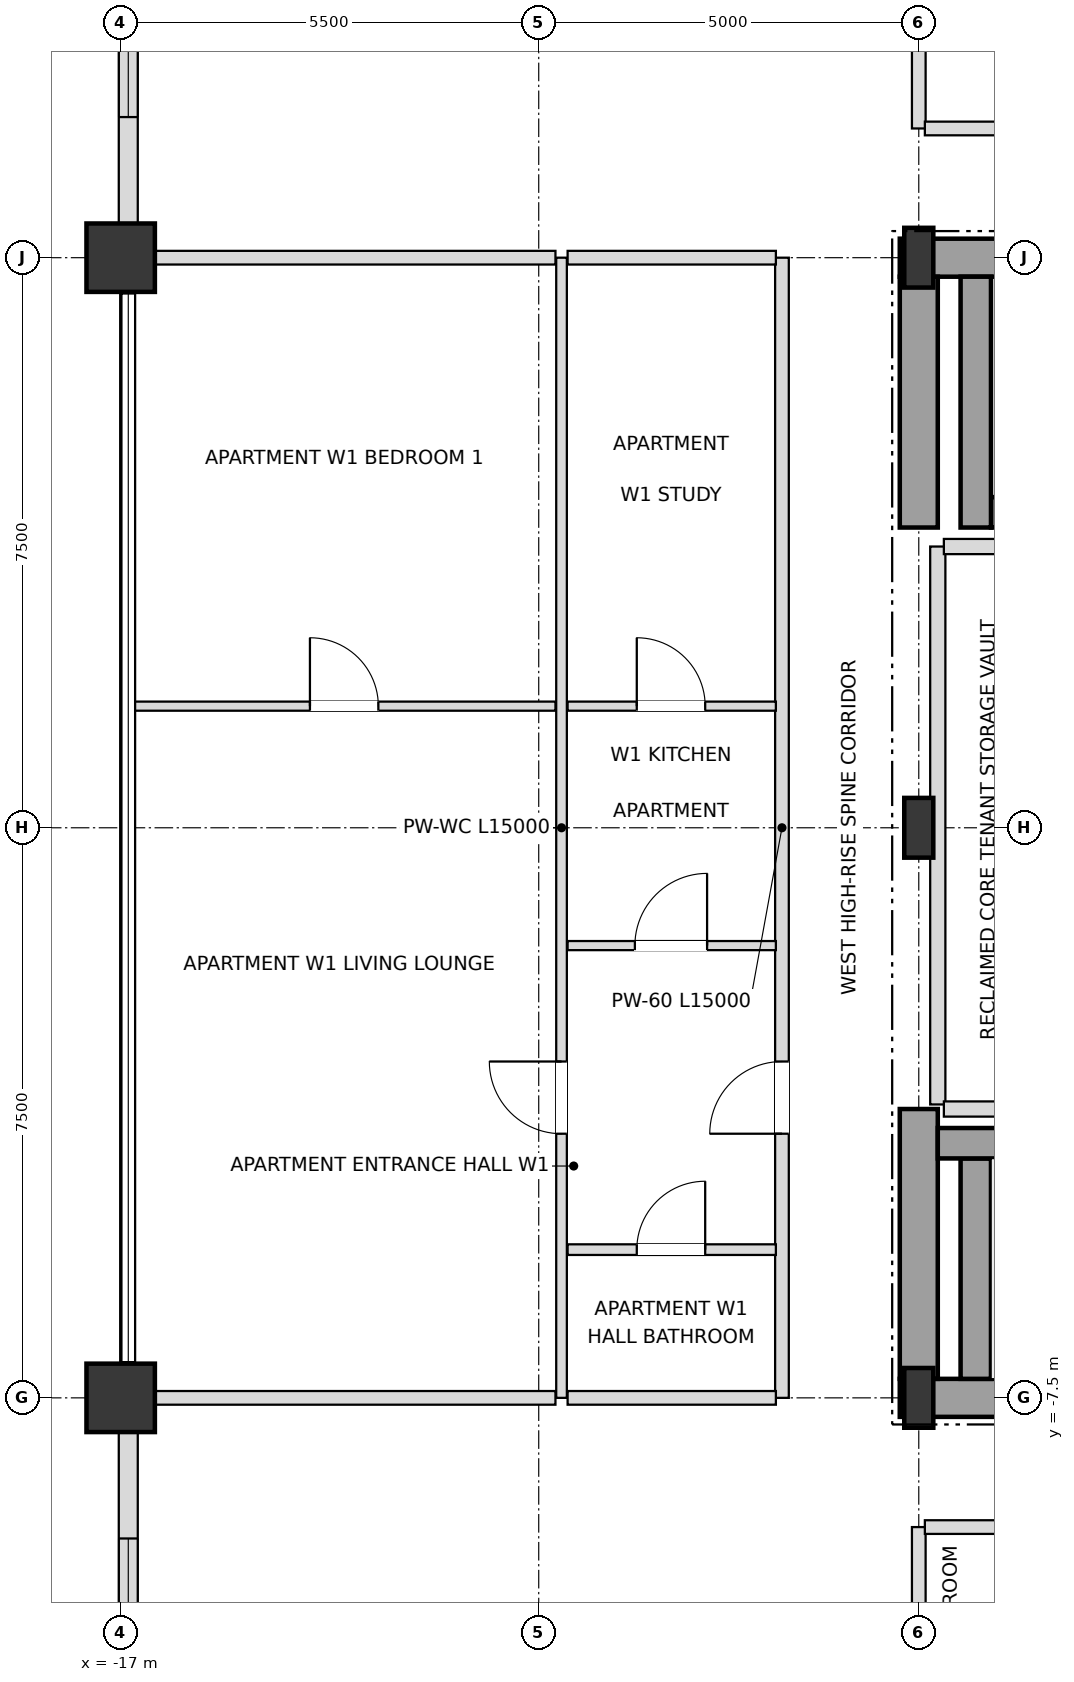
"""IFC4 building model, lengths in metres.
Left out: names, types, materials, properties, quantities, classifications, styles, units other than length and angle.
Written with IfcOpenShell. Run it as: python <this file> out.ifc"""

import sys

from ifc_helpers import new_model, si_unit, direction, frame, frame_2d, origin, origin_2d, place, context, subcontext, project, spatial, rectangle, i_section, extrude, element, fill, save


model = new_model("IFC4")
c1 = context("Model", 3, precision=1e-05, world=origin(), true_north=direction((0.0, 1.0)))
c2 = subcontext(c1, "Body", "Model", "MODEL_VIEW")
j1 = project(units=[si_unit("LENGTHUNIT", "METRE"), si_unit("PLANEANGLEUNIT", "RADIAN")], contexts=[c1])
p1 = place(None, origin())
s1 = spatial("IfcSite", under=j1, at=p1, CompositionType="ELEMENT")
p2 = place(p1, origin())
s2 = spatial("IfcBuilding", under=s1, at=p2, CompositionType="ELEMENT")
p3 = place(p2, frame((0.0, 0.0, 297.9)))
s3 = spatial("IfcBuildingStorey", under=s2, at=p3, CompositionType="ELEMENT", Elevation=297.9)
for number, where, z_axis, x_axis in (
    (1, (-6.5, -7.5, 0.0), (0.0, 0.0, 1.0), (1.0, 0.0, 0.0)),
    (2, (-6.5, 0.0, 0.0), (0.0, 0.0, 1.0), (1.0, 0.0, 0.0)),
    (3, (-6.5, 7.5, 0.0), (0.0, 0.0, 1.0), (1.0, 0.0, 0.0)),
):
    element("IfcColumn", number, at=place(p3, frame(where, z_axis=z_axis, x_axis=x_axis)), inside=s3, PredefinedType="COLUMN", context=c2, shape_type="SweptSolid", body=[
        extrude(i_section(OverallWidth=0.382, OverallDepth=0.786, WebThickness=0.02, FlangeThickness=0.033, at=origin_2d()), origin(), (0.0, 0.0, 1.0), 3.6),
    ])
for number, where, z_axis, x_axis in (
    (4, (-17.0, 7.5, 0.0), (0.0, 0.0, 1.0), (1.0, 0.0, 0.0)),
    (5, (-17.0, -7.5, 0.0), (0.0, 0.0, 1.0), (1.0, 0.0, 0.0)),
):
    element("IfcColumn", number, at=place(p3, frame(where, z_axis=z_axis, x_axis=x_axis)), inside=s3, PredefinedType="USERDEFINED", context=c2, shape_type="SweptSolid", body=[
        extrude(rectangle(XDim=0.9, YDim=0.9, at=origin_2d()), origin(), (0.0, 0.0, 1.0), 3.6),
    ])
p4 = place(p3, frame((-16.9, 12.555, 0.0), z_axis=(0.0, 0.0, 1.0), x_axis=(0.0, -1.0, 0.0)))
e6 = element("IfcWall", 6, at=p4, inside=s3, PredefinedType="SOLIDWALL", context=c2, shape_type="SweptSolid", body=[
    extrude(rectangle(XDim=4.61, YDim=0.25, at=frame_2d((2.305, 0.0))), origin(), (0.0, 0.0, 1.0), 2.748),
])
p5 = place(p4, frame((1.405, 0.0, 0.72)))
e7 = element("IfcOpeningElement", 7, at=p5, cuts=e6, PredefinedType="OPENING", context=c2, shape_type="SweptSolid", body=[
    extrude(rectangle(XDim=1.8, YDim=1.68, at=frame_2d((0.9, 0.84))), frame((0.0, 0.135, 0.0), z_axis=(0.0, -1.0, 0.0), x_axis=(1.0, 0.0, 0.0)), (0.0, 0.0, 1.0), 0.27),
])
p6 = place(p3, frame((-16.9, -7.945, 0.0), z_axis=(0.0, 0.0, 1.0), x_axis=(0.0, -1.0, 0.0)))
e8 = element("IfcWall", 8, at=p6, inside=s3, PredefinedType="SOLIDWALL", context=c2, shape_type="SweptSolid", body=[
    extrude(rectangle(XDim=4.61, YDim=0.25, at=frame_2d((2.305, 0.0))), origin(), (0.0, 0.0, 1.0), 2.748),
])
p7 = place(p6, frame((1.405, 0.0, 0.72)))
e9 = element("IfcOpeningElement", 9, at=p7, cuts=e8, PredefinedType="OPENING", context=c2, shape_type="SweptSolid", body=[
    extrude(rectangle(XDim=1.8, YDim=1.68, at=frame_2d((0.9, 0.84))), frame((0.0, 0.135, 0.0), z_axis=(0.0, -1.0, 0.0), x_axis=(1.0, 0.0, 0.0)), (0.0, 0.0, 1.0), 0.27),
])
p8 = place(p3, frame((-6.75, -7.5, 0.0), z_axis=(0.0, 0.0, 1.0), x_axis=(1.0, 0.0, 0.0)))
e10 = element("IfcWall", 10, at=p8, inside=s3, PredefinedType="SHEAR", context=c2, shape_type="SweptSolid", body=[
    extrude(rectangle(XDim=6.75, YDim=0.5, at=frame_2d((3.375, 0.0))), origin(), (0.0, 0.0, 1.0), 3.38),
])
p9 = place(p3, frame((-6.75, 7.5, 0.0), z_axis=(0.0, 0.0, 1.0), x_axis=(1.0, 0.0, 0.0)))
e11 = element("IfcWall", 11, at=p9, inside=s3, PredefinedType="SHEAR", context=c2, shape_type="SweptSolid", body=[
    extrude(rectangle(XDim=6.75, YDim=0.5, at=frame_2d((3.375, 0.0))), origin(), (0.0, 0.0, 1.0), 3.38),
])
p10 = place(p9, frame((1.65, 0.0, 0.0)))
e12 = element("IfcOpeningElement", 12, at=p10, cuts=e11, PredefinedType="OPENING", context=c2, shape_type="SweptSolid", body=[
    extrude(rectangle(XDim=1.05, YDim=2.15, at=frame_2d((0.525, 1.075))), frame((0.0, 0.26, 0.0), z_axis=(0.0, -1.0, 0.0), x_axis=(1.0, 0.0, 0.0)), (0.0, 0.0, 1.0), 0.52),
])
p11 = place(p3, frame((-6.5, -7.25, 0.0), z_axis=(0.0, 0.0, 1.0), x_axis=(0.0, 1.0, 0.0)))
e13 = element("IfcWall", 13, at=p11, inside=s3, PredefinedType="SHEAR", context=c2, shape_type="SweptSolid", body=[
    extrude(rectangle(XDim=3.55, YDim=0.5, at=frame_2d((1.775, 0.0))), origin(), (0.0, 0.0, 1.0), 3.38),
])
p12 = place(p3, frame((-6.5, 3.95, 0.0), z_axis=(0.0, 0.0, 1.0), x_axis=(0.0, 1.0, 0.0)))
e14 = element("IfcWall", 14, at=p12, inside=s3, PredefinedType="SHEAR", context=c2, shape_type="SweptSolid", body=[
    extrude(rectangle(XDim=3.3, YDim=0.5, at=frame_2d((1.65, 0.0))), origin(), (0.0, 0.0, 1.0), 3.38),
])
p13 = place(p3, frame((-5.75, -7.25, 0.0), z_axis=(0.0, 0.0, 1.0), x_axis=(0.0, 1.0, 0.0)))
e15 = element("IfcWall", 15, at=p13, inside=s3, PredefinedType="SHEAR", context=c2, shape_type="SweptSolid", body=[
    extrude(rectangle(XDim=2.9, YDim=0.4, at=frame_2d((1.45, 0.0))), origin(), (0.0, 0.0, 1.0), 3.38),
])
p14 = place(p3, frame((-6.25, -4.15, 0.0), z_axis=(0.0, 0.0, 1.0), x_axis=(1.0, 0.0, 0.0)))
e16 = element("IfcWall", 16, at=p14, inside=s3, PredefinedType="SHEAR", context=c2, shape_type="SweptSolid", body=[
    extrude(rectangle(XDim=7.78, YDim=0.4, at=frame_2d((3.89, 0.0))), origin(), (0.0, 0.0, 1.0), 3.38),
])
p15 = place(p3, frame((-5.55, 4.15, 0.0), z_axis=(0.0, 0.0, 1.0), x_axis=(1.0, 0.0, 0.0)))
e17 = element("IfcWall", 17, at=p15, inside=s3, PredefinedType="SHEAR", context=c2, shape_type="SweptSolid", body=[
    extrude(rectangle(XDim=7.08, YDim=0.4, at=frame_2d((3.54, 0.0))), origin(), (0.0, 0.0, 1.0), 3.38),
])
p16 = place(p3, frame((-5.75, 3.95, 0.0), z_axis=(0.0, 0.0, 1.0), x_axis=(0.0, 1.0, 0.0)))
e18 = element("IfcWall", 18, at=p16, inside=s3, PredefinedType="SHEAR", context=c2, shape_type="SweptSolid", body=[
    extrude(rectangle(XDim=3.3, YDim=0.4, at=frame_2d((1.65, 0.0))), origin(), (0.0, 0.0, 1.0), 3.38),
])
p17 = place(p3, frame((-11.2, -7.5, 0.0), z_axis=(0.0, 0.0, 1.0), x_axis=(0.0, 1.0, 0.0)))
e19 = element("IfcWall", 19, at=p17, inside=s3, PredefinedType="PARTITIONING", context=c2, shape_type="SweptSolid", body=[
    extrude(rectangle(XDim=15.0, YDim=0.14, at=frame_2d((7.5, 0.0))), origin(), (0.0, 0.0, 1.0), 3.38),
])
p18 = place(p17, frame((3.475, 0.0, 0.0)))
e20 = element("IfcOpeningElement", 20, at=p18, cuts=e19, PredefinedType="OPENING", context=c2, shape_type="SweptSolid", body=[
    extrude(rectangle(XDim=0.95, YDim=2.1, at=frame_2d((0.475, 1.05))), frame((0.0, 0.08, 0.0), z_axis=(0.0, -1.0, 0.0), x_axis=(1.0, 0.0, 0.0)), (0.0, 0.0, 1.0), 0.16),
])
p19 = place(p3, frame((-8.3, -7.5, 0.0), z_axis=(0.0, 0.0, 1.0), x_axis=(0.0, 1.0, 0.0)))
e21 = element("IfcWall", 21, at=p19, inside=s3, PredefinedType="PARTITIONING", context=c2, shape_type="SweptSolid", body=[
    extrude(rectangle(XDim=15.0, YDim=0.18, at=frame_2d((7.5, 0.0))), origin(), (0.0, 0.0, 1.0), 3.38),
])
p20 = place(p19, frame((3.475, 0.0, 0.0)))
e22 = element("IfcOpeningElement", 22, at=p20, cuts=e21, PredefinedType="OPENING", context=c2, shape_type="SweptSolid", body=[
    extrude(rectangle(XDim=0.95, YDim=2.15, at=frame_2d((0.475, 1.075))), frame((0.0, 0.1, 0.0), z_axis=(0.0, -1.0, 0.0), x_axis=(1.0, 0.0, 0.0)), (0.0, 0.0, 1.0), 0.2),
])
for number, where, z_axis, x_axis in (
    (23, (-6.5, -19.9, 0.0), (0.0, 0.0, 1.0), (0.0, 1.0, 0.0)),
    (24, (-6.5, 9.2, 0.0), (0.0, 0.0, 1.0), (0.0, 1.0, 0.0)),
):
    element("IfcWall", number, at=place(p3, frame(where, z_axis=z_axis, x_axis=x_axis)), inside=s3, PredefinedType="PARTITIONING", context=c2, shape_type="SweptSolid", body=[
        extrude(rectangle(XDim=10.7, YDim=0.18, at=frame_2d((5.35, 0.0))), origin(), (0.0, 0.0, 1.0), 2.826),
    ])
p21 = place(p3, frame((-6.25, -3.64, 0.0), z_axis=(0.0, 0.0, 1.0), x_axis=(0.0, 1.0, 0.0)))
e25 = element("IfcWall", 25, at=p21, inside=s3, PredefinedType="SOLIDWALL", context=c2, shape_type="SweptSolid", body=[
    extrude(rectangle(XDim=7.34, YDim=0.2, at=frame_2d((3.67, 0.0))), origin(), (0.0, 0.0, 1.0), 3.38),
])
p22 = place(p3, frame((-6.42, -9.2, 0.0), z_axis=(0.0, 0.0, 1.0), x_axis=(1.0, 0.0, 0.0)))
e26 = element("IfcWall", 26, at=p22, inside=s3, PredefinedType="PARTITIONING", context=c2, shape_type="SweptSolid", body=[
    extrude(rectangle(XDim=1.64, YDim=0.18, at=frame_2d((0.82, 0.0))), origin(), (0.0, 0.0, 1.0), 3.38),
])
p23 = place(p3, frame((-16.9, -7.5, 0.0), z_axis=(0.0, 0.0, 1.0), x_axis=(1.0, 0.0, 0.0)))
e27 = element("IfcWall", 27, at=p23, inside=s3, PredefinedType="PARTITIONING", context=c2, shape_type="SweptSolid", body=[
    extrude(rectangle(XDim=5.62, YDim=0.18, at=frame_2d((2.81, 0.0))), origin(), (0.0, 0.0, 1.0), 2.826),
])
p24 = place(p3, frame((-11.12, -7.5, 0.0), z_axis=(0.0, 0.0, 1.0), x_axis=(1.0, 0.0, 0.0)))
e28 = element("IfcWall", 28, at=p24, inside=s3, PredefinedType="PARTITIONING", context=c2, shape_type="SweptSolid", body=[
    extrude(rectangle(XDim=2.74, YDim=0.18, at=frame_2d((1.37, 0.0))), origin(), (0.0, 0.0, 1.0), 2.826),
])
p25 = place(p3, frame((-11.12, -5.55, 0.0), z_axis=(0.0, 0.0, 1.0), x_axis=(1.0, 0.0, 0.0)))
e29 = element("IfcWall", 29, at=p25, inside=s3, PredefinedType="PARTITIONING", context=c2, shape_type="SweptSolid", body=[
    extrude(rectangle(XDim=2.74, YDim=0.14, at=frame_2d((1.37, 0.0))), origin(), (0.0, 0.0, 1.0), 3.38),
])
p26 = place(p25, frame((0.91, 0.0, 0.0)))
e30 = element("IfcOpeningElement", 30, at=p26, cuts=e29, PredefinedType="OPENING", context=c2, shape_type="SweptSolid", body=[
    extrude(rectangle(XDim=0.9, YDim=2.1, at=frame_2d((0.45, 1.05))), frame((0.0, 0.08, 0.0), z_axis=(0.0, -1.0, 0.0), x_axis=(1.0, 0.0, 0.0)), (0.0, 0.0, 1.0), 0.16),
])
p27 = place(p3, frame((-6.17, -3.7, 0.0), z_axis=(0.0, 0.0, 1.0), x_axis=(1.0, 0.0, 0.0)))
e31 = element("IfcWall", 31, at=p27, inside=s3, PredefinedType="SOLIDWALL", context=c2, shape_type="SweptSolid", body=[
    extrude(rectangle(XDim=1.94, YDim=0.2, at=frame_2d((0.97, 0.0))), origin(), (0.0, 0.0, 1.0), 3.38),
])
p28 = place(p3, frame((-11.12, -1.55, 0.0), z_axis=(0.0, 0.0, 1.0), x_axis=(1.0, 0.0, 0.0)))
e32 = element("IfcWall", 32, at=p28, inside=s3, PredefinedType="PARTITIONING", context=c2, shape_type="SweptSolid", body=[
    extrude(rectangle(XDim=2.74, YDim=0.12, at=frame_2d((1.37, 0.0))), origin(), (0.0, 0.0, 1.0), 3.38),
])
p29 = place(p28, frame((0.885, 0.0, 0.0)))
e33 = element("IfcOpeningElement", 33, at=p29, cuts=e32, PredefinedType="OPENING", context=c2, shape_type="SweptSolid", body=[
    extrude(rectangle(XDim=0.95, YDim=2.1, at=frame_2d((0.475, 1.05))), frame((0.0, 0.07, 0.0), z_axis=(0.0, -1.0, 0.0), x_axis=(1.0, 0.0, 0.0)), (0.0, 0.0, 1.0), 0.14),
])
p30 = place(p3, frame((-16.82, 1.6, 0.0), z_axis=(0.0, 0.0, 1.0), x_axis=(1.0, 0.0, 0.0)))
e34 = element("IfcWall", 34, at=p30, inside=s3, PredefinedType="PARTITIONING", context=c2, shape_type="SweptSolid", body=[
    extrude(rectangle(XDim=5.54, YDim=0.12, at=frame_2d((2.77, 0.0))), origin(), (0.0, 0.0, 1.0), 3.018),
])
p31 = place(p30, frame((2.31, 0.0, 0.0)))
e35 = element("IfcOpeningElement", 35, at=p31, cuts=e34, PredefinedType="OPENING", context=c2, shape_type="SweptSolid", body=[
    extrude(rectangle(XDim=0.9, YDim=2.1, at=frame_2d((0.45, 1.05))), frame((0.0, 0.07, 0.0), z_axis=(0.0, -1.0, 0.0), x_axis=(1.0, 0.0, 0.0)), (0.0, 0.0, 1.0), 0.14),
])
p32 = place(p3, frame((-11.12, 1.6, 0.0), z_axis=(0.0, 0.0, 1.0), x_axis=(1.0, 0.0, 0.0)))
e36 = element("IfcWall", 36, at=p32, inside=s3, PredefinedType="PARTITIONING", context=c2, shape_type="SweptSolid", body=[
    extrude(rectangle(XDim=2.74, YDim=0.12, at=frame_2d((1.37, 0.0))), origin(), (0.0, 0.0, 1.0), 3.38),
])
p33 = place(p32, frame((0.91, 0.0, 0.0)))
e37 = element("IfcOpeningElement", 37, at=p33, cuts=e36, PredefinedType="OPENING", context=c2, shape_type="SweptSolid", body=[
    extrude(rectangle(XDim=0.9, YDim=2.1, at=frame_2d((0.45, 1.05))), frame((0.0, 0.07, 0.0), z_axis=(0.0, -1.0, 0.0), x_axis=(1.0, 0.0, 0.0)), (0.0, 0.0, 1.0), 0.14),
])
p34 = place(p3, frame((-6.17, 3.7, 0.0), z_axis=(0.0, 0.0, 1.0), x_axis=(1.0, 0.0, 0.0)))
e38 = element("IfcWall", 38, at=p34, inside=s3, PredefinedType="SOLIDWALL", context=c2, shape_type="SweptSolid", body=[
    extrude(rectangle(XDim=1.94, YDim=0.2, at=frame_2d((0.97, 0.0))), origin(), (0.0, 0.0, 1.0), 3.38),
])
p35 = place(p3, frame((-16.9, 7.5, 0.0), z_axis=(0.0, 0.0, 1.0), x_axis=(1.0, 0.0, 0.0)))
e39 = element("IfcWall", 39, at=p35, inside=s3, PredefinedType="PARTITIONING", context=c2, shape_type="SweptSolid", body=[
    extrude(rectangle(XDim=5.62, YDim=0.18, at=frame_2d((2.81, 0.0))), origin(), (0.0, 0.0, 1.0), 2.826),
])
p36 = place(p3, frame((-11.12, 7.5, 0.0), z_axis=(0.0, 0.0, 1.0), x_axis=(1.0, 0.0, 0.0)))
e40 = element("IfcWall", 40, at=p36, inside=s3, PredefinedType="PARTITIONING", context=c2, shape_type="SweptSolid", body=[
    extrude(rectangle(XDim=2.74, YDim=0.18, at=frame_2d((1.37, 0.0))), origin(), (0.0, 0.0, 1.0), 2.826),
])
p37 = place(p3, frame((-6.42, 9.2, 0.0), z_axis=(0.0, 0.0, 1.0), x_axis=(1.0, 0.0, 0.0)))
e41 = element("IfcWall", 41, at=p37, inside=s3, PredefinedType="PARTITIONING", context=c2, shape_type="SweptSolid", body=[
    extrude(rectangle(XDim=7.34, YDim=0.18, at=frame_2d((3.67, 0.0))), origin(), (0.0, 0.0, 1.0), 3.38),
])
p38 = place(p37, frame((3.205, 0.0, 0.0)))
e42 = element("IfcOpeningElement", 42, at=p38, cuts=e41, PredefinedType="OPENING", context=c2, shape_type="SweptSolid", body=[
    extrude(rectangle(XDim=0.95, YDim=2.15, at=frame_2d((0.475, 1.075))), frame((0.0, 0.1, 0.0), z_axis=(0.0, -1.0, 0.0), x_axis=(1.0, 0.0, 0.0)), (0.0, 0.0, 1.0), 0.2),
])
p39 = place(p5, origin())
e43 = element("IfcWindow", 43, at=p39, inside=s3, PartitioningType="SINGLE_PANEL", PredefinedType="WINDOW", context=c2, shape_type="SweptSolid", body=[
    extrude(rectangle(XDim=1.8, YDim=1.68, at=frame_2d((0.9, 0.84))), frame((0.0, 0.03, 0.0), z_axis=(0.0, -1.0, 0.0), x_axis=(1.0, 0.0, 0.0)), (0.0, 0.0, 1.0), 0.06),
])
fill(e7, e43)
p40 = place(p7, origin())
e44 = element("IfcWindow", 44, at=p40, inside=s3, PartitioningType="SINGLE_PANEL", PredefinedType="WINDOW", context=c2, shape_type="SweptSolid", body=[
    extrude(rectangle(XDim=1.8, YDim=1.68, at=frame_2d((0.9, 0.84))), frame((0.0, 0.03, 0.0), z_axis=(0.0, -1.0, 0.0), x_axis=(1.0, 0.0, 0.0)), (0.0, 0.0, 1.0), 0.06),
])
fill(e9, e44)
p41 = place(p26, origin())
e45 = element("IfcDoor", 45, at=p41, inside=s3, OperationType="SINGLE_SWING_RIGHT", PredefinedType="DOOR", context=c2, shape_type="SweptSolid", body=[
    extrude(rectangle(XDim=0.9, YDim=2.1, at=frame_2d((0.45, 1.05))), frame((0.0, 0.025, 0.0), z_axis=(0.0, -1.0, 0.0), x_axis=(1.0, 0.0, 0.0)), (0.0, 0.0, 1.0), 0.05),
])
fill(e30, e45)
p42 = place(p20, origin())
e46 = element("IfcDoor", 46, at=p42, inside=s3, OperationType="SINGLE_SWING_LEFT", PredefinedType="DOOR", context=c2, shape_type="SweptSolid", body=[
    extrude(rectangle(XDim=0.95, YDim=2.15, at=frame_2d((0.475, 1.075))), frame((0.0, 0.025, 0.0), z_axis=(0.0, -1.0, 0.0), x_axis=(1.0, 0.0, 0.0)), (0.0, 0.0, 1.0), 0.05),
])
fill(e22, e46)
p43 = place(p29, origin())
e47 = element("IfcDoor", 47, at=p43, inside=s3, OperationType="SINGLE_SWING_RIGHT", PredefinedType="DOOR", context=c2, shape_type="SweptSolid", body=[
    extrude(rectangle(XDim=0.95, YDim=2.1, at=frame_2d((0.475, 1.05))), frame((0.0, 0.025, 0.0), z_axis=(0.0, -1.0, 0.0), x_axis=(1.0, 0.0, 0.0)), (0.0, 0.0, 1.0), 0.05),
])
fill(e33, e47)
p44 = place(p33, origin())
e48 = element("IfcDoor", 48, at=p44, inside=s3, OperationType="SINGLE_SWING_LEFT", PredefinedType="DOOR", context=c2, shape_type="SweptSolid", body=[
    extrude(rectangle(XDim=0.9, YDim=2.1, at=frame_2d((0.45, 1.05))), frame((0.0, 0.025, 0.0), z_axis=(0.0, -1.0, 0.0), x_axis=(1.0, 0.0, 0.0)), (0.0, 0.0, 1.0), 0.05),
])
fill(e37, e48)
p45 = place(p18, origin())
e49 = element("IfcDoor", 49, at=p45, inside=s3, OperationType="SINGLE_SWING_RIGHT", PredefinedType="DOOR", context=c2, shape_type="SweptSolid", body=[
    extrude(rectangle(XDim=0.95, YDim=2.1, at=frame_2d((0.475, 1.05))), frame((0.0, 0.025, 0.0), z_axis=(0.0, -1.0, 0.0), x_axis=(1.0, 0.0, 0.0)), (0.0, 0.0, 1.0), 0.05),
])
fill(e20, e49)
p46 = place(p31, origin())
e50 = element("IfcDoor", 50, at=p46, inside=s3, OperationType="SINGLE_SWING_LEFT", PredefinedType="DOOR", context=c2, shape_type="SweptSolid", body=[
    extrude(rectangle(XDim=0.9, YDim=2.1, at=frame_2d((0.45, 1.05))), frame((0.0, 0.025, 0.0), z_axis=(0.0, -1.0, 0.0), x_axis=(1.0, 0.0, 0.0)), (0.0, 0.0, 1.0), 0.05),
])
fill(e35, e50)
save(model, sys.argv[1])
